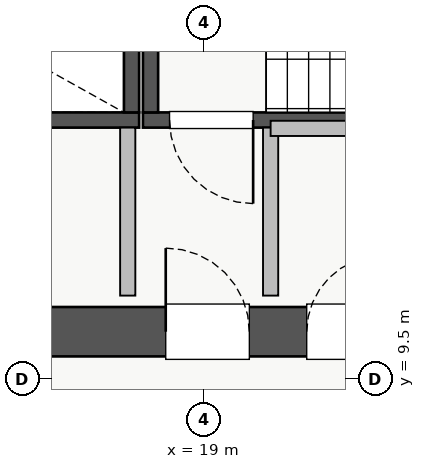
"""IFC4 building model, lengths in metres.
Left out: names, types, materials, properties, quantities, classifications, styles, units other than length and angle.
Written with IfcOpenShell. Run it as: python <this file> out.ifc"""

import sys

from ifc_helpers import new_model, si_unit, direction, frame, frame_2d, origin, place, context, subcontext, project, spatial, rectangle, extrude, source, transform, mapped, element, fill, save


model = new_model("IFC4")
c1 = context("Model", 3, precision=1e-05, world=origin(), true_north=direction((0.0, 1.0)))
c2 = subcontext(c1, "Body", "Model", "MODEL_VIEW")
j1 = project(units=[si_unit("LENGTHUNIT", "METRE"), si_unit("PLANEANGLEUNIT", "RADIAN")], contexts=[c1])
p1 = place(None, origin())
s1 = spatial("IfcSite", under=j1, at=p1, CompositionType="ELEMENT")
p2 = place(p1, origin())
s2 = spatial("IfcBuilding", under=s1, at=p2, CompositionType="ELEMENT")
p3 = place(p2, frame((0.0, 0.0, 132.75)))
s3 = spatial("IfcBuildingStorey", under=s2, at=p3, CompositionType="ELEMENT", Elevation=132.75)
p4 = place(p3, frame((10.85, 12.91, 0.0), z_axis=(0.0, 0.0, 1.0), x_axis=(1.0, 0.0, 0.0)))
e1 = element("IfcWall", 1, at=p4, inside=s3, PredefinedType="SHEAR", context=c2, shape_type="SweptSolid", body=[
    extrude(rectangle(XDim=7.3, YDim=0.2, at=frame_2d((3.65, 0.0))), origin(), (0.0, 0.0, 1.0), 3.25),
])
p5 = place(p4, frame((0.35, 0.0, 0.0)))
e2 = element("IfcOpeningElement", 2, at=p5, cuts=e1, PredefinedType="OPENING", context=c2, shape_type="SweptSolid", body=[
    extrude(rectangle(XDim=1.1, YDim=2.05, at=frame_2d((0.55, 1.025))), frame((0.0, 0.11, 0.0), z_axis=(0.0, -1.0, 0.0), x_axis=(1.0, 0.0, 0.0)), (0.0, 0.0, 1.0), 0.22),
])
p6 = place(p3, frame((18.05, 13.01, 0.0), z_axis=(0.0, 0.0, 1.0), x_axis=(0.0, 1.0, 0.0)))
e3 = element("IfcWall", 3, at=p6, inside=s3, PredefinedType="SHEAR", context=c2, shape_type="SweptSolid", body=[
    extrude(rectangle(XDim=2.94, YDim=0.2, at=frame_2d((1.47, 0.0))), origin(), (0.0, 0.0, 1.0), 3.25),
])
p7 = place(p3, frame((18.2, 12.91, 0.0), z_axis=(0.0, 0.0, 1.0), x_axis=(1.0, 0.0, 0.0)))
e4 = element("IfcWall", 4, at=p7, inside=s3, PredefinedType="SHEAR", context=c2, shape_type="SweptSolid", body=[
    extrude(rectangle(XDim=7.15, YDim=0.2, at=frame_2d((3.575, 0.0))), origin(), (0.0, 0.0, 1.0), 3.25),
])
p8 = place(p7, frame((0.35, 0.0, 0.0)))
e5 = element("IfcOpeningElement", 5, at=p8, cuts=e4, PredefinedType="OPENING", context=c2, shape_type="SweptSolid", body=[
    extrude(rectangle(XDim=1.1, YDim=2.05, at=frame_2d((0.55, 1.025))), frame((0.0, 0.11, 0.0), z_axis=(0.0, -1.0, 0.0), x_axis=(1.0, 0.0, 0.0)), (0.0, 0.0, 1.0), 0.22),
])
p9 = place(p3, frame((18.3, 13.01, 0.0), z_axis=(0.0, 0.0, 1.0), x_axis=(0.0, 1.0, 0.0)))
e6 = element("IfcWall", 6, at=p9, inside=s3, PredefinedType="SHEAR", context=c2, shape_type="SweptSolid", body=[
    extrude(rectangle(XDim=2.94, YDim=0.2, at=frame_2d((1.47, 0.0))), origin(), (0.0, 0.0, 1.0), 3.25),
])
p10 = place(p3, frame((10.2, 10.125, 0.0), z_axis=(0.0, 0.0, 1.0), x_axis=(1.0, 0.0, 0.0)))
e7 = element("IfcWall", 7, at=p10, inside=s3, PredefinedType="SHEAR", context=c2, shape_type="SweptSolid", body=[
    extrude(rectangle(XDim=17.6, YDim=0.65, at=frame_2d((8.8, 0.0))), origin(), (0.0, 0.0, 1.0), 3.25),
])
p11 = place(p10, frame((1.15, 0.0, 0.0)))
e8 = element("IfcOpeningElement", 8, at=p11, cuts=e7, PredefinedType="OPENING", context=c2, shape_type="SweptSolid", body=[
    extrude(rectangle(XDim=1.1, YDim=2.05, at=frame_2d((0.55, 1.025))), frame((0.0, 0.335, 0.0), z_axis=(0.0, -1.0, 0.0), x_axis=(1.0, 0.0, 0.0)), (0.0, 0.0, 1.0), 0.67),
])
p12 = place(p10, frame((8.3, 0.0, 0.0)))
e9 = element("IfcOpeningElement", 9, at=p12, cuts=e7, PredefinedType="OPENING", context=c2, shape_type="SweptSolid", body=[
    extrude(rectangle(XDim=1.1, YDim=2.05, at=frame_2d((0.55, 1.025))), frame((0.0, 0.335, 0.0), z_axis=(0.0, -1.0, 0.0), x_axis=(1.0, 0.0, 0.0)), (0.0, 0.0, 1.0), 0.67),
])
p13 = place(p10, frame((4.9, 0.0, 0.0)))
e10 = element("IfcOpeningElement", 10, at=p13, cuts=e7, PredefinedType="OPENING", context=c2, shape_type="SweptSolid", body=[
    extrude(rectangle(XDim=1.1, YDim=2.05, at=frame_2d((0.55, 1.025))), frame((0.0, 0.335, 0.0), z_axis=(0.0, -1.0, 0.0), x_axis=(1.0, 0.0, 0.0)), (0.0, 0.0, 1.0), 0.67),
])
p14 = place(p10, frame((14.74, 0.0, 0.0)))
e11 = element("IfcOpeningElement", 11, at=p14, cuts=e7, PredefinedType="OPENING", context=c2, shape_type="SweptSolid", body=[
    extrude(rectangle(XDim=1.0, YDim=2.05, at=frame_2d((0.5, 1.025))), frame((0.0, 0.335, 0.0), z_axis=(0.0, -1.0, 0.0), x_axis=(1.0, 0.0, 0.0)), (0.0, 0.0, 1.0), 0.67),
])
p15 = place(p10, frame((10.155, 0.0, 0.0)))
e12 = element("IfcOpeningElement", 12, at=p15, cuts=e7, PredefinedType="OPENING", context=c2, shape_type="SweptSolid", body=[
    extrude(rectangle(XDim=1.0, YDim=2.05, at=frame_2d((0.5, 1.025))), frame((0.0, 0.335, 0.0), z_axis=(0.0, -1.0, 0.0), x_axis=(1.0, 0.0, 0.0)), (0.0, 0.0, 1.0), 0.67),
])
p16 = place(p10, frame((11.87, 0.0, 0.0)))
e13 = element("IfcOpeningElement", 13, at=p16, cuts=e7, PredefinedType="OPENING", context=c2, shape_type="SweptSolid", body=[
    extrude(rectangle(XDim=1.0, YDim=2.05, at=frame_2d((0.5, 1.025))), frame((0.0, 0.335, 0.0), z_axis=(0.0, -1.0, 0.0), x_axis=(1.0, 0.0, 0.0)), (0.0, 0.0, 1.0), 0.67),
])
p17 = place(p10, frame((13.46, 0.0, 0.0)))
e14 = element("IfcOpeningElement", 14, at=p17, cuts=e7, PredefinedType="OPENING", context=c2, shape_type="SweptSolid", body=[
    extrude(rectangle(XDim=1.0, YDim=2.05, at=frame_2d((0.5, 1.025))), frame((0.0, 0.335, 0.0), z_axis=(0.0, -1.0, 0.0), x_axis=(1.0, 0.0, 0.0)), (0.0, 0.0, 1.0), 0.67),
])
for number, where, z_axis, x_axis in (
    (15, (18.0, 10.6, 0.0), (0.0, 0.0, 1.0), (0.0, 1.0, 0.0)),
    (16, (19.88, 10.6, 0.0), (0.0, 0.0, 1.0), (0.0, 1.0, 0.0)),
):
    element("IfcWall", number, at=place(p3, frame(where, z_axis=z_axis, x_axis=x_axis)), inside=s3, PredefinedType="PARTITIONING", context=c2, shape_type="SweptSolid", body=[
        extrude(rectangle(XDim=2.21, YDim=0.2, at=frame_2d((1.105, 0.0))), origin(), (0.0, 0.0, 1.0), 3.07),
    ])
p18 = place(p3, frame((19.88, 12.8, 0.0), z_axis=(0.0, 0.0, 1.0), x_axis=(1.0, 0.0, 0.0)))
e17 = element("IfcWall", 17, at=p18, inside=s3, PredefinedType="PARTITIONING", context=c2, shape_type="SweptSolid", body=[
    extrude(rectangle(XDim=1.87, YDim=0.2, at=frame_2d((0.935, 0.0))), origin(), (0.0, 0.0, 1.0), 3.07),
])
m1 = source(origin(), c2, "Body", "SweptSolid", [
    extrude(rectangle(XDim=1.1, YDim=2.05, at=frame_2d((0.55, 1.025))), frame((0.0, 0.025, 0.0), z_axis=(0.0, -1.0, 0.0), x_axis=(1.0, 0.0, 0.0)), (0.0, 0.0, 1.0), 0.05),
])
p19 = place(p12, origin())
e18 = element("IfcDoor", 18, at=p19, inside=s3, OperationType="SINGLE_SWING_LEFT", PredefinedType="DOOR", context=c2, shape_type="MappedRepresentation", body=[
    mapped(m1, transform((0.0, 0.0, 0.0), x_axis=(1.0, 0.0, 0.0), y_axis=(0.0, 1.0, 0.0), z_axis=(0.0, 0.0, 1.0), scale=1.0)),
])
fill(e9, e18)
p20 = place(p8, frame((1.1, 0.0, 0.0), z_axis=(0.0, 0.0, 1.0), x_axis=(-1.0, 0.0, 0.0)))
e19 = element("IfcDoor", 19, at=p20, inside=s3, OperationType="SINGLE_SWING_RIGHT", PredefinedType="DOOR", context=c2, shape_type="MappedRepresentation", body=[
    mapped(m1, transform((0.0, 0.0, 0.0), x_axis=(1.0, 0.0, 0.0), y_axis=(0.0, 1.0, 0.0), z_axis=(0.0, 0.0, 1.0), scale=1.0)),
])
fill(e5, e19)
m2 = source(origin(), c2, "Body", "SweptSolid", [
    extrude(rectangle(XDim=1.0, YDim=2.05, at=frame_2d((0.5, 1.025))), frame((0.0, 0.025, 0.0), z_axis=(0.0, -1.0, 0.0), x_axis=(1.0, 0.0, 0.0)), (0.0, 0.0, 1.0), 0.05),
])
p21 = place(p15, origin())
e20 = element("IfcDoor", 20, at=p21, inside=s3, OperationType="SINGLE_SWING_RIGHT", PredefinedType="DOOR", context=c2, shape_type="MappedRepresentation", body=[
    mapped(m2, transform((0.0, 0.0, 0.0), x_axis=(1.0, 0.0, 0.0), y_axis=(0.0, 1.0, 0.0), z_axis=(0.0, 0.0, 1.0), scale=1.0)),
])
fill(e12, e20)
save(model, sys.argv[1])
